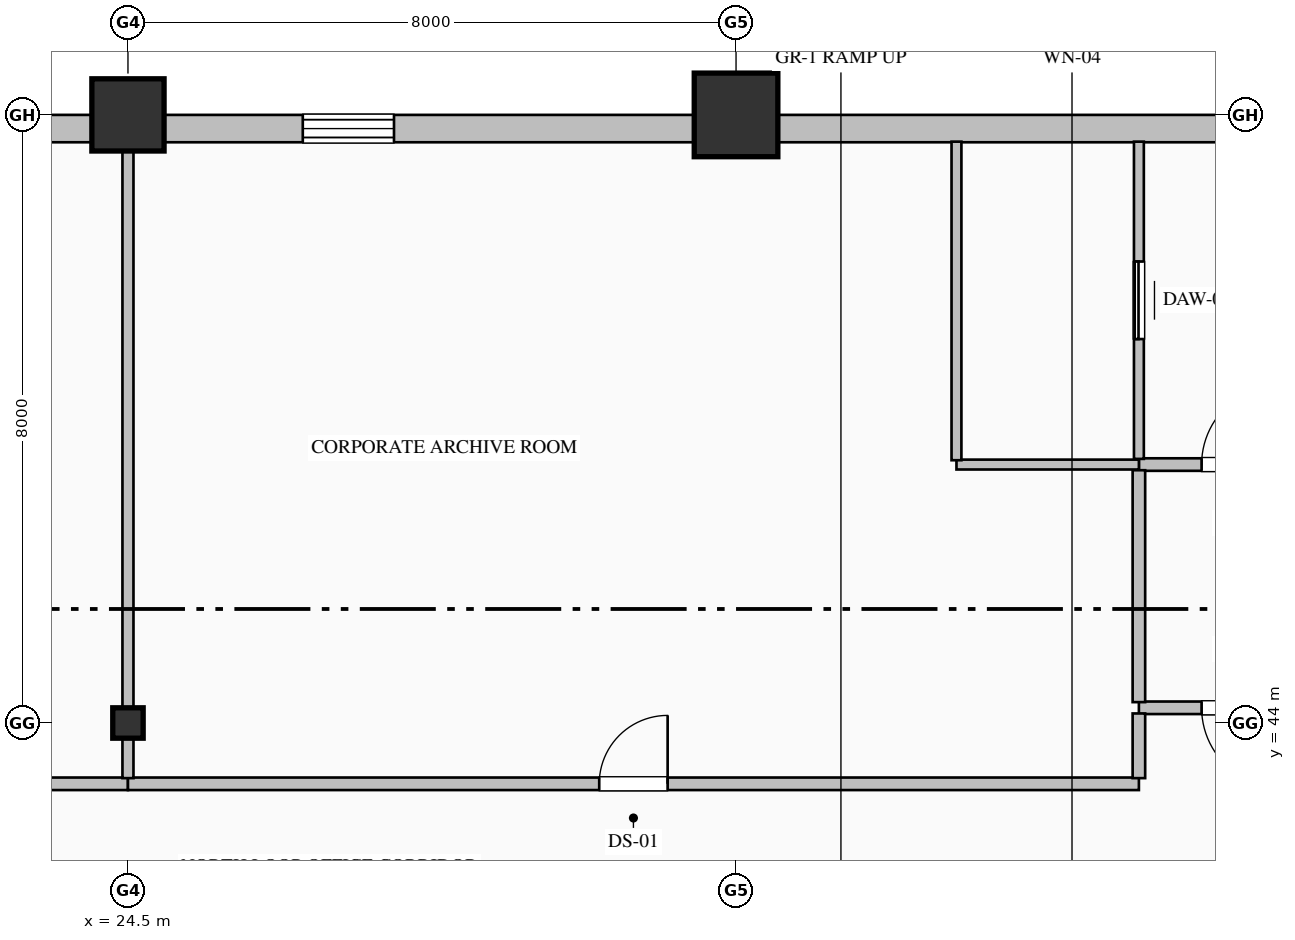
"""IFC4 building model, lengths in metres.
Left out: names, types, materials, properties, quantities, classifications, styles, units other than length and angle.
Written with IfcOpenShell. Run it as: python <this file> out.ifc"""

import sys

from ifc_helpers import new_model, si_unit, direction, frame, frame_2d, origin, origin_2d, place, context, subcontext, project, spatial, rectangle, hollow_rectangle, i_section, extrude, element, fill, save


model = new_model("IFC4")
c1 = context("Model", 3, precision=1e-05, world=origin(), true_north=direction((0.0, 1.0)))
c2 = subcontext(c1, "Body", "Model", "MODEL_VIEW")
j1 = project(units=[si_unit("LENGTHUNIT", "METRE"), si_unit("PLANEANGLEUNIT", "RADIAN")], contexts=[c1])
p1 = place(None, origin())
s1 = spatial("IfcSite", under=j1, at=p1, CompositionType="ELEMENT")
p2 = place(p1, origin())
s2 = spatial("IfcBuilding", under=s1, at=p2, CompositionType="ELEMENT")
p3 = place(p2, frame((0.0, 0.0, 151.0)))
s3 = spatial("IfcBuildingStorey", under=s2, at=p3, CompositionType="ELEMENT", Elevation=151.0)
p4 = place(p3, frame((24.5, 44.0, 0.0), z_axis=(0.0, 0.0, 1.0), x_axis=(1.0, 0.0, 0.0)))
e1 = element("IfcColumn", 1, at=p4, inside=s3, PredefinedType="COLUMN", context=c2, shape_type="SweptSolid", body=[
    extrude(i_section(OverallWidth=0.4, OverallDepth=0.4, WebThickness=0.013, FlangeThickness=0.021, FilletRadius=0.022, at=origin_2d()), origin(), (0.0, 0.0, 1.0), 4.0),
])
p5 = place(p3, frame((24.5, 52.0, 0.0), z_axis=(0.0, 0.0, 1.0), x_axis=(1.0, 0.0, 0.0)))
e2 = element("IfcColumn", 2, at=p5, inside=s3, PredefinedType="COLUMN", context=c2, shape_type="SweptSolid", body=[
    extrude(hollow_rectangle(XDim=0.95, YDim=0.95, WallThickness=0.036, at=origin_2d()), origin(), (0.0, 0.0, 1.0), 4.0),
])
p6 = place(p3, frame((32.5, 52.0, 0.0), z_axis=(0.0, 0.0, 1.0), x_axis=(1.0, 0.0, 0.0)))
e3 = element("IfcColumn", 3, at=p6, inside=s3, PredefinedType="COLUMN", context=c2, shape_type="SweptSolid", body=[
    extrude(hollow_rectangle(XDim=1.1, YDim=1.1, WallThickness=0.04, at=origin_2d()), origin(), (0.0, 0.0, 1.0), 4.0),
])
p7 = place(p3, frame((13.0, 51.82, 0.0), z_axis=(0.0, 0.0, 1.0), x_axis=(1.0, 0.0, 0.0)))
e4 = element("IfcWall", 4, at=p7, inside=s3, PredefinedType="SOLIDWALL", context=c2, shape_type="SweptSolid", body=[
    extrude(rectangle(XDim=27.52, YDim=0.36, at=frame_2d((13.76, 0.0))), origin(), (0.0, 0.0, 1.0), 3.265),
])
p8 = place(p7, frame((6.45, 0.0, 0.85)))
e5 = element("IfcOpeningElement", 5, at=p8, cuts=e4, PredefinedType="OPENING", context=c2, shape_type="SweptSolid", body=[
    extrude(rectangle(XDim=1.5, YDim=1.95, at=frame_2d((0.75, 0.975))), frame((0.0, 0.19, 0.0), z_axis=(0.0, -1.0, 0.0), x_axis=(1.0, 0.0, 0.0)), (0.0, 0.0, 1.0), 0.38),
])
p9 = place(p7, frame((13.8, 0.0, 0.7)))
e6 = element("IfcOpeningElement", 6, at=p9, cuts=e4, PredefinedType="OPENING", context=c2, shape_type="SweptSolid", body=[
    extrude(rectangle(XDim=1.2, YDim=1.85, at=frame_2d((0.6, 0.925))), frame((0.0, 0.19, 0.0), z_axis=(0.0, -1.0, 0.0), x_axis=(1.0, 0.0, 0.0)), (0.0, 0.0, 1.0), 0.38),
])
p10 = place(p3, frame((37.8, 47.4, 0.0), z_axis=(0.0, 0.0, 1.0), x_axis=(1.0, 0.0, 0.0)))
e7 = element("IfcWall", 7, at=p10, inside=s3, PredefinedType="PARTITIONING", context=c2, shape_type="SweptSolid", body=[
    extrude(rectangle(XDim=2.7, YDim=0.165, at=frame_2d((1.35, 0.0))), origin(), (0.0, 0.0, 1.0), 3.765),
])
p11 = place(p10, frame((0.825, 0.0, 0.0)))
e8 = element("IfcOpeningElement", 8, at=p11, cuts=e7, PredefinedType="OPENING", context=c2, shape_type="SweptSolid", body=[
    extrude(rectangle(XDim=1.05, YDim=2.15, at=frame_2d((0.525, 1.075))), frame((0.0, 0.093, 0.0), z_axis=(0.0, -1.0, 0.0), x_axis=(1.0, 0.0, 0.0)), (0.0, 0.0, 1.0), 0.185),
])
p12 = place(p3, frame((40.5, 44.2, 0.0), z_axis=(0.0, 0.0, 1.0), x_axis=(-1.0, 0.0, 0.0)))
e9 = element("IfcWall", 9, at=p12, inside=s3, PredefinedType="PARTITIONING", context=c2, shape_type="SweptSolid", body=[
    extrude(rectangle(XDim=2.7, YDim=0.165, at=frame_2d((1.35, 0.0))), origin(), (0.0, 0.0, 1.0), 3.765),
])
p13 = place(p12, frame((0.825, 0.0, 0.0)))
e10 = element("IfcOpeningElement", 10, at=p13, cuts=e9, PredefinedType="OPENING", context=c2, shape_type="SweptSolid", body=[
    extrude(rectangle(XDim=1.05, YDim=2.15, at=frame_2d((0.525, 1.075))), frame((0.0, 0.093, 0.0), z_axis=(0.0, -1.0, 0.0), x_axis=(1.0, 0.0, 0.0)), (0.0, 0.0, 1.0), 0.185),
])
p14 = place(p3, frame((37.8, 44.274, 0.0), z_axis=(0.0, 0.0, 1.0), x_axis=(0.0, 1.0, 0.0)))
e11 = element("IfcWall", 11, at=p14, inside=s3, PredefinedType="PARTITIONING", context=c2, shape_type="SweptSolid", body=[
    extrude(rectangle(XDim=3.051, YDim=0.165, at=frame_2d((1.525, 0.0))), origin(), (0.0, 0.0, 1.0), 3.765),
])
p15 = place(p3, frame((37.8, 47.475, 0.0), z_axis=(0.0, 0.0, 1.0), x_axis=(0.0, 1.0, 0.0)))
e12 = element("IfcWall", 12, at=p15, inside=s3, PredefinedType="PARTITIONING", context=c2, shape_type="SweptSolid", body=[
    extrude(rectangle(XDim=4.173, YDim=0.13, at=frame_2d((2.087, 0.0))), origin(), (0.0, 0.0, 1.0), 3.765),
])
p16 = place(p15, frame((1.577, 0.0, 0.0)))
e13 = element("IfcOpeningElement", 13, at=p16, cuts=e12, PredefinedType="OPENING", context=c2, shape_type="SweptSolid", body=[
    extrude(rectangle(XDim=1.02, YDim=2.15, at=frame_2d((0.51, 1.075))), frame((0.0, 0.075, 0.0), z_axis=(0.0, -1.0, 0.0), x_axis=(1.0, 0.0, 0.0)), (0.0, 0.0, 1.0), 0.15),
])
p17 = place(p3, frame((37.8, 47.4, 0.0), z_axis=(0.0, 0.0, 1.0), x_axis=(-1.0, 0.0, 0.0)))
e14 = element("IfcWall", 14, at=p17, inside=s3, PredefinedType="PARTITIONING", context=c2, shape_type="SweptSolid", body=[
    extrude(rectangle(XDim=2.4, YDim=0.13, at=frame_2d((1.2, 0.0))), origin(), (0.0, 0.0, 1.0), 3.765),
])
p18 = place(p3, frame((35.4, 47.457, 0.0), z_axis=(0.0, 0.0, 1.0), x_axis=(0.0, 1.0, 0.0)))
e15 = element("IfcWall", 15, at=p18, inside=s3, PredefinedType="PARTITIONING", context=c2, shape_type="SweptSolid", body=[
    extrude(rectangle(XDim=4.191, YDim=0.13, at=frame_2d((2.095, 0.0))), origin(), (0.0, 0.0, 1.0), 3.765),
])
p19 = place(p3, frame((16.5, 43.2, 0.0), z_axis=(0.0, 0.0, 1.0), x_axis=(1.0, 0.0, 0.0)))
e16 = element("IfcWall", 16, at=p19, inside=s3, PredefinedType="PARTITIONING", context=c2, shape_type="SweptSolid", body=[
    extrude(rectangle(XDim=8.0, YDim=0.165, at=frame_2d((4.0, 0.0))), origin(), (0.0, 0.0, 1.0), 3.765),
])
p20 = place(p3, frame((24.5, 43.2, 0.0), z_axis=(0.0, 0.0, 1.0), x_axis=(1.0, 0.0, 0.0)))
e17 = element("IfcWall", 17, at=p20, inside=s3, PredefinedType="PARTITIONING", context=c2, shape_type="SweptSolid", body=[
    extrude(rectangle(XDim=13.3, YDim=0.165, at=frame_2d((6.65, 0.0))), origin(), (0.0, 0.0, 1.0), 3.765),
])
p21 = place(p20, frame((6.2, 0.0, 0.0)))
e18 = element("IfcOpeningElement", 18, at=p21, cuts=e17, PredefinedType="OPENING", context=c2, shape_type="SweptSolid", body=[
    extrude(rectangle(XDim=0.9, YDim=2.15, at=frame_2d((0.45, 1.075))), frame((0.0, 0.093, 0.0), z_axis=(0.0, -1.0, 0.0), x_axis=(1.0, 0.0, 0.0)), (0.0, 0.0, 1.0), 0.185),
])
p22 = place(p3, frame((37.8, 43.274, 0.0), z_axis=(0.0, 0.0, 1.0), x_axis=(0.0, 1.0, 0.0)))
e19 = element("IfcWall", 19, at=p22, inside=s3, PredefinedType="PARTITIONING", context=c2, shape_type="SweptSolid", body=[
    extrude(rectangle(XDim=0.851, YDim=0.165, at=frame_2d((0.426, 0.0))), origin(), (0.0, 0.0, 1.0), 3.765),
])
p23 = place(p3, frame((24.5, 51.648, 0.0), z_axis=(0.0, 0.0, 1.0), x_axis=(0.0, -1.0, 0.0)))
e20 = element("IfcWall", 20, at=p23, inside=s3, PredefinedType="PARTITIONING", context=c2, shape_type="SweptSolid", body=[
    extrude(rectangle(XDim=8.374, YDim=0.145, at=frame_2d((4.187, 0.0))), origin(), (0.0, 0.0, 1.0), 3.157),
])
p24 = place(p9, origin())
e21 = element("IfcWindow", 21, at=p24, inside=s3, PartitioningType="DOUBLE_PANEL_VERTICAL", PredefinedType="WINDOW", context=c2, shape_type="SweptSolid", body=[
    extrude(rectangle(XDim=1.2, YDim=1.85, at=frame_2d((0.6, 0.925))), frame((0.0, 0.15, 0.0), z_axis=(0.0, -1.0, 0.0), x_axis=(1.0, 0.0, 0.0)), (0.0, 0.0, 1.0), 0.06),
])
fill(e6, e21)
p25 = place(p11, origin())
e22 = element("IfcDoor", 22, at=p25, inside=s3, OperationType="SINGLE_SWING_RIGHT", PredefinedType="DOOR", context=c2, shape_type="SweptSolid", body=[
    extrude(rectangle(XDim=1.05, YDim=2.15, at=frame_2d((0.525, 1.075))), frame((0.0, 0.025, 0.0), z_axis=(0.0, -1.0, 0.0), x_axis=(1.0, 0.0, 0.0)), (0.0, 0.0, 1.0), 0.05),
])
fill(e8, e22)
p26 = place(p13, origin())
e23 = element("IfcDoor", 23, at=p26, inside=s3, OperationType="SINGLE_SWING_LEFT", PredefinedType="DOOR", context=c2, shape_type="SweptSolid", body=[
    extrude(rectangle(XDim=1.05, YDim=2.15, at=frame_2d((0.525, 1.075))), frame((0.0, 0.025, 0.0), z_axis=(0.0, -1.0, 0.0), x_axis=(1.0, 0.0, 0.0)), (0.0, 0.0, 1.0), 0.05),
])
fill(e10, e23)
p27 = place(p16, origin())
e24 = element("IfcDoor", 24, at=p27, inside=s3, OperationType="SLIDING_TO_LEFT", PredefinedType="DOOR", context=c2, shape_type="SweptSolid", body=[
    extrude(rectangle(XDim=1.02, YDim=2.15, at=frame_2d((0.51, 1.075))), frame((0.0, 0.025, 0.0), z_axis=(0.0, -1.0, 0.0), x_axis=(1.0, 0.0, 0.0)), (0.0, 0.0, 1.0), 0.05),
])
fill(e13, e24)
p28 = place(p21, origin())
e25 = element("IfcDoor", 25, at=p28, inside=s3, OperationType="SINGLE_SWING_RIGHT", PredefinedType="DOOR", context=c2, shape_type="SweptSolid", body=[
    extrude(rectangle(XDim=0.9, YDim=2.15, at=frame_2d((0.45, 1.075))), frame((0.0, 0.025, 0.0), z_axis=(0.0, -1.0, 0.0), x_axis=(1.0, 0.0, 0.0)), (0.0, 0.0, 1.0), 0.05),
])
fill(e18, e25)
save(model, sys.argv[1])
